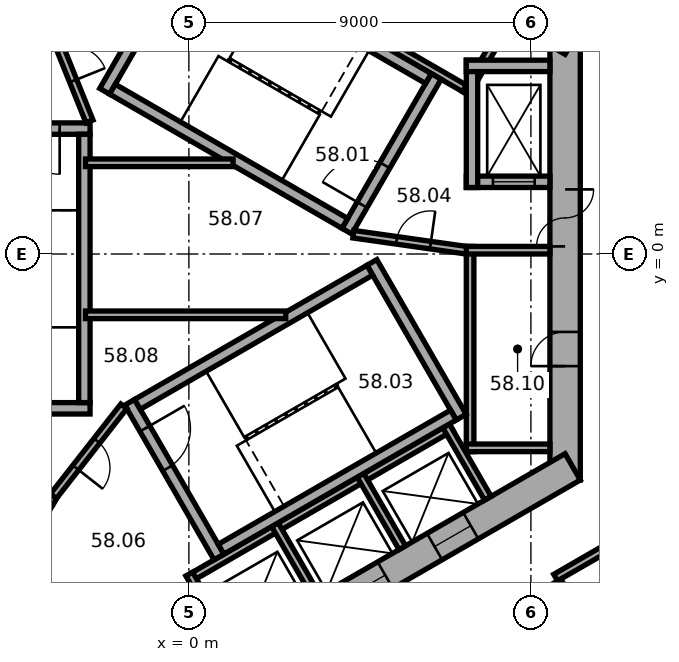
"""IFC4 building model, lengths in metres.
Left out: names, types, materials, properties, quantities, classifications, styles, units other than length and angle.
Written with IfcOpenShell. Run it as: python <this file> out.ifc"""

import sys

from ifc_helpers import new_model, si_unit, direction, frame, frame_2d, origin, place, context, subcontext, project, spatial, rectangle, extrude, element, fill, save


model = new_model("IFC4")
c1 = context("Model", 3, precision=1e-05, world=origin(), true_north=direction((0.0, 1.0)))
c2 = subcontext(c1, "Body", "Model", "MODEL_VIEW")
j1 = project(units=[si_unit("LENGTHUNIT", "METRE"), si_unit("PLANEANGLEUNIT", "RADIAN")], contexts=[c1])
p1 = place(None, origin())
s1 = spatial("IfcSite", under=j1, at=p1, CompositionType="ELEMENT")
p2 = place(p1, origin())
s2 = spatial("IfcBuilding", under=s1, at=p2, CompositionType="ELEMENT")
p3 = place(p2, frame((0.0, 0.0, 236.5)))
s3 = spatial("IfcBuildingStorey", under=s2, at=p3, CompositionType="ELEMENT", Elevation=236.5)
p4 = place(p3, frame((9.9, -5.947, 0.0), z_axis=(0.0, 0.0, 1.0), x_axis=(0.0, 1.0, 0.0)))
e1 = element("IfcWall", 1, at=p4, inside=s3, PredefinedType="SHEAR", context=c2, shape_type="SweptSolid", body=[
    extrude(rectangle(XDim=11.894, YDim=0.8, at=frame_2d((5.947, 0.0))), origin(), (0.0, 0.0, 1.0), 3.7),
])
p5 = place(p4, frame((6.147, 0.0, 0.0)))
e2 = element("IfcOpeningElement", 2, at=p5, cuts=e1, PredefinedType="OPENING", context=c2, shape_type="SweptSolid", body=[
    extrude(rectangle(XDim=1.5, YDim=2.1, at=frame_2d((0.75, 1.05))), frame((0.0, 0.41, 0.0), z_axis=(0.0, -1.0, 0.0), x_axis=(1.0, 0.0, 0.0)), (0.0, 0.0, 1.0), 0.82),
])
p6 = place(p4, frame((2.997, 0.0, 0.0)))
e3 = element("IfcOpeningElement", 3, at=p6, cuts=e1, PredefinedType="OPENING", context=c2, shape_type="SweptSolid", body=[
    extrude(rectangle(XDim=0.9, YDim=2.1, at=frame_2d((0.45, 1.05))), frame((0.0, 0.41, 0.0), z_axis=(0.0, -1.0, 0.0), x_axis=(1.0, 0.0, 0.0)), (0.0, 0.0, 1.0), 0.82),
])
p7 = place(p3, frame((10.1, 5.6, 0.0), z_axis=(0.0, 0.0, 1.0), x_axis=(-0.866023897231, 0.500002609418, 0.0)))
e4 = element("IfcWall", 4, at=p7, inside=s3, PredefinedType="SHEAR", context=c2, shape_type="SweptSolid", body=[
    extrude(rectangle(XDim=11.894, YDim=0.8, at=frame_2d((5.947, 0.0))), origin(), (0.0, 0.0, 1.0), 3.7),
])
p8 = place(p7, frame((2.597, 0.0, 0.0)))
e5 = element("IfcOpeningElement", 5, at=p8, cuts=e4, PredefinedType="OPENING", context=c2, shape_type="SweptSolid", body=[
    extrude(rectangle(XDim=0.9, YDim=2.1, at=frame_2d((0.45, 1.05))), frame((0.0, 0.41, 0.0), z_axis=(0.0, -1.0, 0.0), x_axis=(1.0, 0.0, 0.0)), (0.0, 0.0, 1.0), 0.82),
])
p9 = place(p7, frame((6.497, 0.0, 0.0)))
e6 = element("IfcOpeningElement", 6, at=p9, cuts=e4, PredefinedType="OPENING", context=c2, shape_type="SweptSolid", body=[
    extrude(rectangle(XDim=0.9, YDim=2.1, at=frame_2d((0.45, 1.05))), frame((0.0, 0.41, 0.0), z_axis=(0.0, -1.0, 0.0), x_axis=(1.0, 0.0, 0.0)), (0.0, 0.0, 1.0), 0.82),
])
p10 = place(p3, frame((0.2, 11.547, 0.0), z_axis=(0.0, 0.0, 1.0), x_axis=(-0.866023897231, -0.500002609418, 0.0)))
e7 = element("IfcWall", 7, at=p10, inside=s3, PredefinedType="SHEAR", context=c2, shape_type="SweptSolid", body=[
    extrude(rectangle(XDim=11.894, YDim=0.8, at=frame_2d((5.947, 0.0))), origin(), (0.0, 0.0, 1.0), 3.7),
])
p11 = place(p10, frame((6.147, 0.0, 0.0)))
e8 = element("IfcOpeningElement", 8, at=p11, cuts=e7, PredefinedType="OPENING", context=c2, shape_type="SweptSolid", body=[
    extrude(rectangle(XDim=1.5, YDim=2.1, at=frame_2d((0.75, 1.05))), frame((0.0, 0.41, 0.0), z_axis=(0.0, -1.0, 0.0), x_axis=(1.0, 0.0, 0.0)), (0.0, 0.0, 1.0), 0.82),
])
p12 = place(p10, frame((2.997, 0.0, 0.0)))
e9 = element("IfcOpeningElement", 9, at=p12, cuts=e7, PredefinedType="OPENING", context=c2, shape_type="SweptSolid", body=[
    extrude(rectangle(XDim=0.9, YDim=2.1, at=frame_2d((0.45, 1.05))), frame((0.0, 0.41, 0.0), z_axis=(0.0, -1.0, 0.0), x_axis=(1.0, 0.0, 0.0)), (0.0, 0.0, 1.0), 0.82),
])
p13 = place(p3, frame((-10.1, -5.6, 0.0), z_axis=(0.0, 0.0, 1.0), x_axis=(0.866023897231, -0.500002609418, 0.0)))
e10 = element("IfcWall", 10, at=p13, inside=s3, PredefinedType="SHEAR", context=c2, shape_type="SweptSolid", body=[
    extrude(rectangle(XDim=11.894, YDim=0.8, at=frame_2d((5.947, 0.0))), origin(), (0.0, 0.0, 1.0), 3.7),
])
p14 = place(p13, frame((6.147, 0.0, 0.0)))
e11 = element("IfcOpeningElement", 11, at=p14, cuts=e10, PredefinedType="OPENING", context=c2, shape_type="SweptSolid", body=[
    extrude(rectangle(XDim=1.5, YDim=2.1, at=frame_2d((0.75, 1.05))), frame((0.0, 0.41, 0.0), z_axis=(0.0, -1.0, 0.0), x_axis=(1.0, 0.0, 0.0)), (0.0, 0.0, 1.0), 0.82),
])
p15 = place(p13, frame((1.597, 0.0, 0.0)))
e12 = element("IfcOpeningElement", 12, at=p15, cuts=e10, PredefinedType="OPENING", context=c2, shape_type="SweptSolid", body=[
    extrude(rectangle(XDim=1.1, YDim=2.1, at=frame_2d((0.55, 1.05))), frame((0.0, 0.41, 0.0), z_axis=(0.0, -1.0, 0.0), x_axis=(1.0, 0.0, 0.0)), (0.0, 0.0, 1.0), 0.82),
])
p16 = place(p13, frame((4.197, 0.0, 0.0)))
e13 = element("IfcOpeningElement", 13, at=p16, cuts=e10, PredefinedType="OPENING", context=c2, shape_type="SweptSolid", body=[
    extrude(rectangle(XDim=1.1, YDim=2.1, at=frame_2d((0.55, 1.05))), frame((0.0, 0.41, 0.0), z_axis=(0.0, -1.0, 0.0), x_axis=(1.0, 0.0, 0.0)), (0.0, 0.0, 1.0), 0.82),
])
p17 = place(p3, frame((-0.2, -11.547, 0.0), z_axis=(0.0, 0.0, 1.0), x_axis=(0.866023897231, 0.500002609418, 0.0)))
e14 = element("IfcWall", 14, at=p17, inside=s3, PredefinedType="SHEAR", context=c2, shape_type="SweptSolid", body=[
    extrude(rectangle(XDim=11.894, YDim=0.8, at=frame_2d((5.947, 0.0))), origin(), (0.0, 0.0, 1.0), 3.7),
])
p18 = place(p17, frame((2.497, 0.0, 0.0)))
e15 = element("IfcOpeningElement", 15, at=p18, cuts=e14, PredefinedType="OPENING", context=c2, shape_type="SweptSolid", body=[
    extrude(rectangle(XDim=1.1, YDim=2.1, at=frame_2d((0.55, 1.05))), frame((0.0, 0.41, 0.0), z_axis=(0.0, -1.0, 0.0), x_axis=(1.0, 0.0, 0.0)), (0.0, 0.0, 1.0), 0.82),
])
p19 = place(p17, frame((5.097, 0.0, 0.0)))
e16 = element("IfcOpeningElement", 16, at=p19, cuts=e14, PredefinedType="OPENING", context=c2, shape_type="SweptSolid", body=[
    extrude(rectangle(XDim=1.1, YDim=2.1, at=frame_2d((0.55, 1.05))), frame((0.0, 0.41, 0.0), z_axis=(0.0, -1.0, 0.0), x_axis=(1.0, 0.0, 0.0)), (0.0, 0.0, 1.0), 0.82),
])
p20 = place(p17, frame((7.697, 0.0, 0.0)))
e17 = element("IfcOpeningElement", 17, at=p20, cuts=e14, PredefinedType="OPENING", context=c2, shape_type="SweptSolid", body=[
    extrude(rectangle(XDim=1.1, YDim=2.1, at=frame_2d((0.55, 1.05))), frame((0.0, 0.41, 0.0), z_axis=(0.0, -1.0, 0.0), x_axis=(1.0, 0.0, 0.0)), (0.0, 0.0, 1.0), 0.82),
])
p21 = place(p3, frame((7.4, -5.2, 0.0), z_axis=(0.0, 0.0, 1.0), x_axis=(0.0, 1.0, 0.0)))
e18 = element("IfcWall", 18, at=p21, inside=s3, PredefinedType="PARTITIONING", context=c2, shape_type="SweptSolid", body=[
    extrude(rectangle(XDim=5.4, YDim=0.2, at=frame_2d((2.7, 0.0))), origin(), (0.0, 0.0, 1.0), 3.42),
])
for number, where, z_axis, x_axis in (
    (19, (7.3, -5.1, 0.0), (0.0, 0.0, 1.0), (1.0, 0.0, 0.0)),
    (20, (7.3, 0.1, 0.0), (0.0, 0.0, 1.0), (1.0, 0.0, 0.0)),
):
    element("IfcWall", number, at=place(p3, frame(where, z_axis=z_axis, x_axis=x_axis)), inside=s3, PredefinedType="PARTITIONING", context=c2, shape_type="SweptSolid", body=[
        extrude(rectangle(XDim=2.2, YDim=0.2, at=frame_2d((1.1, 0.0))), origin(), (0.0, 0.0, 1.0), 3.42),
    ])
p22 = place(p3, frame((7.424, 4.259, 0.0), z_axis=(0.0, 0.0, 1.0), x_axis=(-0.866026010844, 0.49999894854, 0.0)))
e21 = element("IfcWall", 21, at=p22, inside=s3, PredefinedType="PARTITIONING", context=c2, shape_type="SweptSolid", body=[
    extrude(rectangle(XDim=8.0, YDim=0.2, at=frame_2d((4.0, 0.0))), origin(), (0.0, 0.0, 1.0), 3.42),
])
p23 = place(p3, frame((7.287, 4.222, 0.0), z_axis=(0.0, 0.0, 1.0), x_axis=(0.499946605688, 0.86605622881, 0.0)))
e22 = element("IfcWall", 22, at=p23, inside=s3, PredefinedType="PARTITIONING", context=c2, shape_type="SweptSolid", body=[
    extrude(rectangle(XDim=2.2, YDim=0.2, at=frame_2d((1.1, 0.0))), origin(), (0.0, 0.0, 1.0), 3.42),
])
p24 = place(p3, frame((-8.203, -3.809, 0.0), z_axis=(0.0, 0.0, 1.0), x_axis=(0.866028230842, -0.499995103361, 0.0)))
e23 = element("IfcWall", 23, at=p24, inside=s3, PredefinedType="PARTITIONING", context=c2, shape_type="SweptSolid", body=[
    extrude(rectangle(XDim=5.4, YDim=0.2, at=frame_2d((2.7, 0.0))), origin(), (0.0, 0.0, 1.0), 3.42),
])
p25 = place(p3, frame((-3.563, -6.372, 0.0), z_axis=(0.0, 0.0, 1.0), x_axis=(-0.499994660107, -0.866028486751, 0.0)))
e24 = element("IfcWall", 24, at=p25, inside=s3, PredefinedType="PARTITIONING", context=c2, shape_type="SweptSolid", body=[
    extrude(rectangle(XDim=2.2, YDim=0.2, at=frame_2d((1.1, 0.0))), origin(), (0.0, 0.0, 1.0), 3.42),
])
p26 = place(p3, frame((-0.024, -8.559, 0.0), z_axis=(0.0, 0.0, 1.0), x_axis=(0.866026010844, 0.49999894854, 0.0)))
e25 = element("IfcWall", 25, at=p26, inside=s3, PredefinedType="PARTITIONING", context=c2, shape_type="SweptSolid", body=[
    extrude(rectangle(XDim=8.0, YDim=0.2, at=frame_2d((4.0, 0.0))), origin(), (0.0, 0.0, 1.0), 3.42),
])
for number, where, z_axis, x_axis in (
    (26, (0.013, -8.422, 0.0), (0.0, 0.0, 1.0), (0.5, -0.866, 0.0)),
    (27, (2.264, -7.122, 0.0), (0.0, 0.0, 1.0), (0.5, -0.866, 0.0)),
    (28, (4.516, -5.822, 0.0), (0.0, 0.0, 1.0), (0.5, -0.866, 0.0)),
    (29, (6.768, -4.522, 0.0), (0.0, 0.0, 1.0), (0.5, -0.866, 0.0)),
):
    element("IfcWall", number, at=place(p3, frame(where, z_axis=z_axis, x_axis=x_axis)), inside=s3, PredefinedType="PARTITIONING", context=c2, shape_type="SweptSolid", body=[
        extrude(rectangle(XDim=2.2, YDim=0.2, at=frame_2d((1.1, 0.0))), origin(), (0.0, 0.0, 1.0), 3.42),
    ])
p27 = place(p3, frame((4.158, 0.602, 0.0), z_axis=(0.0, 0.0, 1.0), x_axis=(0.499977259774, 0.866038532462, 0.0)))
e30 = element("IfcWall", 30, at=p27, inside=s3, PredefinedType="SHEAR", context=c2, shape_type="SweptSolid", body=[
    extrude(rectangle(XDim=4.7, YDim=0.3, at=frame_2d((2.35, 0.0))), origin(), (0.0, 0.0, 1.0), 3.42),
])
p28 = place(p27, frame((0.8, 0.0, 0.0)))
e31 = element("IfcOpeningElement", 31, at=p28, cuts=e30, PredefinedType="OPENING", context=c2, shape_type="SweptSolid", body=[
    extrude(rectangle(XDim=1.2, YDim=2.1, at=frame_2d((0.6, 1.05))), frame((0.0, 0.16, 0.0), z_axis=(0.0, -1.0, 0.0), x_axis=(1.0, 0.0, 0.0)), (0.0, 0.0, 1.0), 0.32),
])
p29 = place(p3, frame((-2.216, 4.282, 0.0), z_axis=(0.0, 0.0, 1.0), x_axis=(0.499977259774, 0.866038532462, 0.0)))
e32 = element("IfcWall", 32, at=p29, inside=s3, PredefinedType="SHEAR", context=c2, shape_type="SweptSolid", body=[
    extrude(rectangle(XDim=4.7, YDim=0.3, at=frame_2d((2.35, 0.0))), origin(), (0.0, 0.0, 1.0), 3.42),
])
for number, where, z_axis, x_axis in (
    (33, (4.103, 0.807, 0.0), (0.0, 0.0, 1.0), (-0.866, 0.5, 0.0)),
    (34, (6.303, 4.617, 0.0), (0.0, 0.0, 1.0), (-0.866, 0.5, 0.0)),
):
    element("IfcWall", number, at=place(p3, frame(where, z_axis=z_axis, x_axis=x_axis)), inside=s3, PredefinedType="SHEAR", context=c2, shape_type="SweptSolid", body=[
        extrude(rectangle(XDim=7.06, YDim=0.3, at=frame_2d((3.53, 0.0))), origin(), (0.0, 0.0, 1.0), 3.42),
    ])
p30 = place(p3, frame((-2.6, 3.3, 0.0), z_axis=(0.0, 0.0, 1.0), x_axis=(-1.0, 0.0, 0.0)))
e35 = element("IfcWall", 35, at=p30, inside=s3, PredefinedType="SHEAR", context=c2, shape_type="SweptSolid", body=[
    extrude(rectangle(XDim=4.7, YDim=0.3, at=frame_2d((2.35, 0.0))), origin(), (0.0, 0.0, 1.0), 3.42),
])
p31 = place(p30, frame((0.8, 0.0, 0.0)))
e36 = element("IfcOpeningElement", 36, at=p31, cuts=e35, PredefinedType="OPENING", context=c2, shape_type="SweptSolid", body=[
    extrude(rectangle(XDim=1.2, YDim=2.1, at=frame_2d((0.6, 1.05))), frame((0.0, 0.16, 0.0), z_axis=(0.0, -1.0, 0.0), x_axis=(1.0, 0.0, 0.0)), (0.0, 0.0, 1.0), 0.32),
])
p32 = place(p3, frame((-2.6, -4.06, 0.0), z_axis=(0.0, 0.0, 1.0), x_axis=(-1.0, 0.0, 0.0)))
e37 = element("IfcWall", 37, at=p32, inside=s3, PredefinedType="SHEAR", context=c2, shape_type="SweptSolid", body=[
    extrude(rectangle(XDim=4.7, YDim=0.3, at=frame_2d((2.35, 0.0))), origin(), (0.0, 0.0, 1.0), 3.42),
])
p33 = place(p3, frame((-2.75, 3.15, 0.0), z_axis=(0.0, 0.0, 1.0), x_axis=(0.0, -1.0, 0.0)))
e38 = element("IfcWall", 38, at=p33, inside=s3, PredefinedType="SHEAR", context=c2, shape_type="SweptSolid", body=[
    extrude(rectangle(XDim=7.06, YDim=0.3, at=frame_2d((3.53, 0.0))), origin(), (0.0, 0.0, 1.0), 3.42),
])
p34 = place(p3, frame((-1.558, -3.902, 0.0), z_axis=(0.0, 0.0, 1.0), x_axis=(0.499977259774, -0.866038532462, 0.0)))
e39 = element("IfcWall", 39, at=p34, inside=s3, PredefinedType="SHEAR", context=c2, shape_type="SweptSolid", body=[
    extrude(rectangle(XDim=4.7, YDim=0.3, at=frame_2d((2.35, 0.0))), origin(), (0.0, 0.0, 1.0), 3.42),
])
p35 = place(p34, frame((0.8, 0.0, 0.0)))
e40 = element("IfcOpeningElement", 40, at=p35, cuts=e39, PredefinedType="OPENING", context=c2, shape_type="SweptSolid", body=[
    extrude(rectangle(XDim=1.2, YDim=2.1, at=frame_2d((0.6, 1.05))), frame((0.0, 0.16, 0.0), z_axis=(0.0, -1.0, 0.0), x_axis=(1.0, 0.0, 0.0)), (0.0, 0.0, 1.0), 0.32),
])
p36 = place(p3, frame((4.816, -0.222, 0.0), z_axis=(0.0, 0.0, 1.0), x_axis=(0.499977259774, -0.866038532462, 0.0)))
e41 = element("IfcWall", 41, at=p36, inside=s3, PredefinedType="SHEAR", context=c2, shape_type="SweptSolid", body=[
    extrude(rectangle(XDim=4.7, YDim=0.3, at=frame_2d((2.35, 0.0))), origin(), (0.0, 0.0, 1.0), 3.42),
])
for number, where, z_axis, x_axis in (
    (42, (-1.353, -3.957, 0.0), (0.0, 0.0, 1.0), (0.866, 0.5, 0.0)),
    (43, (0.847, -7.767, 0.0), (0.0, 0.0, 1.0), (0.866, 0.5, 0.0)),
):
    element("IfcWall", number, at=place(p3, frame(where, z_axis=z_axis, x_axis=x_axis)), inside=s3, PredefinedType="SHEAR", context=c2, shape_type="SweptSolid", body=[
        extrude(rectangle(XDim=7.06, YDim=0.3, at=frame_2d((3.53, 0.0))), origin(), (0.0, 0.0, 1.0), 3.42),
    ])
p37 = place(p3, frame((7.3, 1.9, 0.0), z_axis=(0.0, 0.0, 1.0), x_axis=(1.0, 0.0, 0.0)))
e44 = element("IfcWall", 44, at=p37, inside=s3, PredefinedType="SHEAR", context=c2, shape_type="SweptSolid", body=[
    extrude(rectangle(XDim=2.2, YDim=0.3, at=frame_2d((1.1, 0.0))), origin(), (0.0, 0.0, 1.0), 3.42),
])
p38 = place(p37, frame((0.7, 0.0, 0.0)))
e45 = element("IfcOpeningElement", 45, at=p38, cuts=e44, PredefinedType="OPENING", context=c2, shape_type="SweptSolid", body=[
    extrude(rectangle(XDim=1.1, YDim=2.1, at=frame_2d((0.55, 1.05))), frame((0.0, 0.16, 0.0), z_axis=(0.0, -1.0, 0.0), x_axis=(1.0, 0.0, 0.0)), (0.0, 0.0, 1.0), 0.32),
])
p39 = place(p3, frame((7.45, 1.75, 0.0), z_axis=(0.0, 0.0, 1.0), x_axis=(0.0, 1.0, 0.0)))
e46 = element("IfcWall", 46, at=p39, inside=s3, PredefinedType="SHEAR", context=c2, shape_type="SweptSolid", body=[
    extrude(rectangle(XDim=3.35, YDim=0.3, at=frame_2d((1.675, 0.0))), origin(), (0.0, 0.0, 1.0), 3.42),
])
p40 = place(p3, frame((7.3, 4.95, 0.0), z_axis=(0.0, 0.0, 1.0), x_axis=(1.0, 0.0, 0.0)))
e47 = element("IfcWall", 47, at=p40, inside=s3, PredefinedType="SHEAR", context=c2, shape_type="SweptSolid", body=[
    extrude(rectangle(XDim=2.2, YDim=0.3, at=frame_2d((1.1, 0.0))), origin(), (0.0, 0.0, 1.0), 3.42),
])
p41 = place(p3, frame((4.327, 0.521, 0.0), z_axis=(0.0, 0.0, 1.0), x_axis=(0.990124376366, -0.14019172346, 0.0)))
e48 = element("IfcWall", 48, at=p41, inside=s3, PredefinedType="PARTITIONING", context=c2, shape_type="SweptSolid", body=[
    extrude(rectangle(XDim=3.002, YDim=0.2, at=frame_2d((1.501, 0.0))), origin(), (0.0, 0.0, 1.0), 3.42),
])
p42 = place(p41, frame((1.15, 0.0, 0.0)))
e49 = element("IfcOpeningElement", 49, at=p42, cuts=e48, PredefinedType="OPENING", context=c2, shape_type="SweptSolid", body=[
    extrude(rectangle(XDim=0.9, YDim=2.1, at=frame_2d((0.45, 1.05))), frame((0.0, 0.11, 0.0), z_axis=(0.0, -1.0, 0.0), x_axis=(1.0, 0.0, 0.0)), (0.0, 0.0, 1.0), 0.22),
])
p43 = place(p3, frame((-2.615, 3.487, 0.0), z_axis=(0.0, 0.0, 1.0), x_axis=(-0.373576831041, 0.92759924068, 0.0)))
e50 = element("IfcWall", 50, at=p43, inside=s3, PredefinedType="PARTITIONING", context=c2, shape_type="SweptSolid", body=[
    extrude(rectangle(XDim=3.002, YDim=0.2, at=frame_2d((1.501, 0.0))), origin(), (0.0, 0.0, 1.0), 3.42),
])
p44 = place(p43, frame((1.15, 0.0, 0.0)))
e51 = element("IfcOpeningElement", 51, at=p44, cuts=e50, PredefinedType="OPENING", context=c2, shape_type="SweptSolid", body=[
    extrude(rectangle(XDim=0.9, YDim=2.1, at=frame_2d((0.45, 1.05))), frame((0.0, 0.11, 0.0), z_axis=(0.0, -1.0, 0.0), x_axis=(1.0, 0.0, 0.0)), (0.0, 0.0, 1.0), 0.22),
])
p45 = place(p3, frame((-1.712, -4.008, 0.0), z_axis=(0.0, 0.0, 1.0), x_axis=(-0.616549420702, -0.787316208287, 0.0)))
e52 = element("IfcWall", 52, at=p45, inside=s3, PredefinedType="PARTITIONING", context=c2, shape_type="SweptSolid", body=[
    extrude(rectangle(XDim=3.002, YDim=0.2, at=frame_2d((1.501, 0.0))), origin(), (0.0, 0.0, 1.0), 3.42),
])
p46 = place(p45, frame((1.15, 0.0, 0.0)))
e53 = element("IfcOpeningElement", 53, at=p46, cuts=e52, PredefinedType="OPENING", context=c2, shape_type="SweptSolid", body=[
    extrude(rectangle(XDim=0.9, YDim=2.1, at=frame_2d((0.45, 1.05))), frame((0.0, 0.11, 0.0), z_axis=(0.0, -1.0, 0.0), x_axis=(1.0, 0.0, 0.0)), (0.0, 0.0, 1.0), 0.22),
])
p47 = place(p3, frame((-2.72, -1.6, 0.0), z_axis=(0.0, 0.0, 1.0), x_axis=(1.0, 0.0, 0.0)))
e54 = element("IfcWall", 54, at=p47, inside=s3, PredefinedType="PARTITIONING", context=c2, shape_type="SweptSolid", body=[
    extrude(rectangle(XDim=5.269, YDim=0.2, at=frame_2d((2.634, 0.0))), origin(), (0.0, 0.0, 1.0), 3.42),
])
p48 = place(p3, frame((-2.72, 2.4, 0.0), z_axis=(0.0, 0.0, 1.0), x_axis=(1.0, 0.0, 0.0)))
e55 = element("IfcWall", 55, at=p48, inside=s3, PredefinedType="PARTITIONING", context=c2, shape_type="SweptSolid", body=[
    extrude(rectangle(XDim=3.883, YDim=0.2, at=frame_2d((1.941, 0.0))), origin(), (0.0, 0.0, 1.0), 3.42),
])
p49 = place(p3, frame((9.652, -8.515, 0.0), z_axis=(0.0, 0.0, 1.0), x_axis=(0.866020375458, 0.500008709215, 0.0)))
e56 = element("IfcWall", 56, at=p49, inside=s3, PredefinedType="PARTITIONING", context=c2, shape_type="SweptSolid", body=[
    extrude(rectangle(XDim=1.846, YDim=0.2, at=frame_2d((0.923, 0.0))), origin(), (0.0, 0.0, 1.0), 3.42),
])
p50 = place(p3, frame((10.202, -9.469, 0.0), z_axis=(0.0, 0.0, 1.0), x_axis=(-0.499968756647, 0.866043441391, 0.0)))
e57 = element("IfcWall", 57, at=p50, inside=s3, PredefinedType="PARTITIONING", context=c2, shape_type="SweptSolid", body=[
    extrude(rectangle(XDim=1.001, YDim=0.2, at=frame_2d((0.5, 0.0))), origin(), (0.0, 0.0, 1.0), 3.42),
])
p51 = place(p5, origin())
e58 = element("IfcDoor", 58, at=p51, inside=s3, OperationType="DOUBLE_DOOR_SINGLE_SWING", PredefinedType="DOOR", context=c2, shape_type="SweptSolid", body=[
    extrude(rectangle(XDim=1.5, YDim=2.1, at=frame_2d((0.75, 1.05))), frame((0.0, 0.025, 0.0), z_axis=(0.0, -1.0, 0.0), x_axis=(1.0, 0.0, 0.0)), (0.0, 0.0, 1.0), 0.05),
])
fill(e2, e58)
p52 = place(p28, origin())
e59 = element("IfcDoor", 59, at=p52, inside=s3, OperationType="SINGLE_SWING_RIGHT", PredefinedType="DOOR", context=c2, shape_type="SweptSolid", body=[
    extrude(rectangle(XDim=1.2, YDim=2.1, at=frame_2d((0.6, 1.05))), frame((0.0, 0.025, 0.0), z_axis=(0.0, -1.0, 0.0), x_axis=(1.0, 0.0, 0.0)), (0.0, 0.0, 1.0), 0.05),
])
fill(e31, e59)
p53 = place(p31, origin())
e60 = element("IfcDoor", 60, at=p53, inside=s3, OperationType="SINGLE_SWING_RIGHT", PredefinedType="DOOR", context=c2, shape_type="SweptSolid", body=[
    extrude(rectangle(XDim=1.2, YDim=2.1, at=frame_2d((0.6, 1.05))), frame((0.0, 0.025, 0.0), z_axis=(0.0, -1.0, 0.0), x_axis=(1.0, 0.0, 0.0)), (0.0, 0.0, 1.0), 0.05),
])
fill(e36, e60)
p54 = place(p35, origin())
e61 = element("IfcDoor", 61, at=p54, inside=s3, OperationType="SINGLE_SWING_RIGHT", PredefinedType="DOOR", context=c2, shape_type="SweptSolid", body=[
    extrude(rectangle(XDim=1.2, YDim=2.1, at=frame_2d((0.6, 1.05))), frame((0.0, 0.025, 0.0), z_axis=(0.0, -1.0, 0.0), x_axis=(1.0, 0.0, 0.0)), (0.0, 0.0, 1.0), 0.05),
])
fill(e40, e61)
p55 = place(p42, origin())
e62 = element("IfcDoor", 62, at=p55, inside=s3, OperationType="SINGLE_SWING_LEFT", PredefinedType="DOOR", context=c2, shape_type="SweptSolid", body=[
    extrude(rectangle(XDim=0.9, YDim=2.1, at=frame_2d((0.45, 1.05))), frame((0.0, 0.025, 0.0), z_axis=(0.0, -1.0, 0.0), x_axis=(1.0, 0.0, 0.0)), (0.0, 0.0, 1.0), 0.05),
])
fill(e49, e62)
p56 = place(p44, origin())
e63 = element("IfcDoor", 63, at=p56, inside=s3, OperationType="SINGLE_SWING_LEFT", PredefinedType="DOOR", context=c2, shape_type="SweptSolid", body=[
    extrude(rectangle(XDim=0.9, YDim=2.1, at=frame_2d((0.45, 1.05))), frame((0.0, 0.025, 0.0), z_axis=(0.0, -1.0, 0.0), x_axis=(1.0, 0.0, 0.0)), (0.0, 0.0, 1.0), 0.05),
])
fill(e51, e63)
p57 = place(p46, origin())
e64 = element("IfcDoor", 64, at=p57, inside=s3, OperationType="SINGLE_SWING_LEFT", PredefinedType="DOOR", context=c2, shape_type="SweptSolid", body=[
    extrude(rectangle(XDim=0.9, YDim=2.1, at=frame_2d((0.45, 1.05))), frame((0.0, 0.025, 0.0), z_axis=(0.0, -1.0, 0.0), x_axis=(1.0, 0.0, 0.0)), (0.0, 0.0, 1.0), 0.05),
])
fill(e53, e64)
p58 = place(p6, origin())
e65 = element("IfcDoor", 65, at=p58, inside=s3, OperationType="SINGLE_SWING_LEFT", PredefinedType="DOOR", context=c2, shape_type="SweptSolid", body=[
    extrude(rectangle(XDim=0.9, YDim=2.1, at=frame_2d((0.45, 1.05))), frame((0.0, 0.025, 0.0), z_axis=(0.0, -1.0, 0.0), x_axis=(1.0, 0.0, 0.0)), (0.0, 0.0, 1.0), 0.05),
])
fill(e3, e65)
p59 = place(p38, origin())
e66 = element("IfcDoor", 66, at=p59, inside=s3, OperationType="DOUBLE_DOOR_SLIDING", PredefinedType="DOOR", context=c2, shape_type="SweptSolid", body=[
    extrude(rectangle(XDim=1.1, YDim=2.1, at=frame_2d((0.55, 1.05))), frame((0.0, 0.025, 0.0), z_axis=(0.0, -1.0, 0.0), x_axis=(1.0, 0.0, 0.0)), (0.0, 0.0, 1.0), 0.05),
])
fill(e45, e66)
p60 = place(p19, origin())
e67 = element("IfcDoor", 67, at=p60, inside=s3, OperationType="DOUBLE_DOOR_SLIDING", PredefinedType="DOOR", context=c2, shape_type="SweptSolid", body=[
    extrude(rectangle(XDim=1.1, YDim=2.1, at=frame_2d((0.55, 1.05))), frame((0.0, 0.025, 0.0), z_axis=(0.0, -1.0, 0.0), x_axis=(1.0, 0.0, 0.0)), (0.0, 0.0, 1.0), 0.05),
])
fill(e16, e67)
p61 = place(p20, origin())
e68 = element("IfcDoor", 68, at=p61, inside=s3, OperationType="DOUBLE_DOOR_SLIDING", PredefinedType="DOOR", context=c2, shape_type="SweptSolid", body=[
    extrude(rectangle(XDim=1.1, YDim=2.1, at=frame_2d((0.55, 1.05))), frame((0.0, 0.025, 0.0), z_axis=(0.0, -1.0, 0.0), x_axis=(1.0, 0.0, 0.0)), (0.0, 0.0, 1.0), 0.05),
])
fill(e17, e68)
save(model, sys.argv[1])
